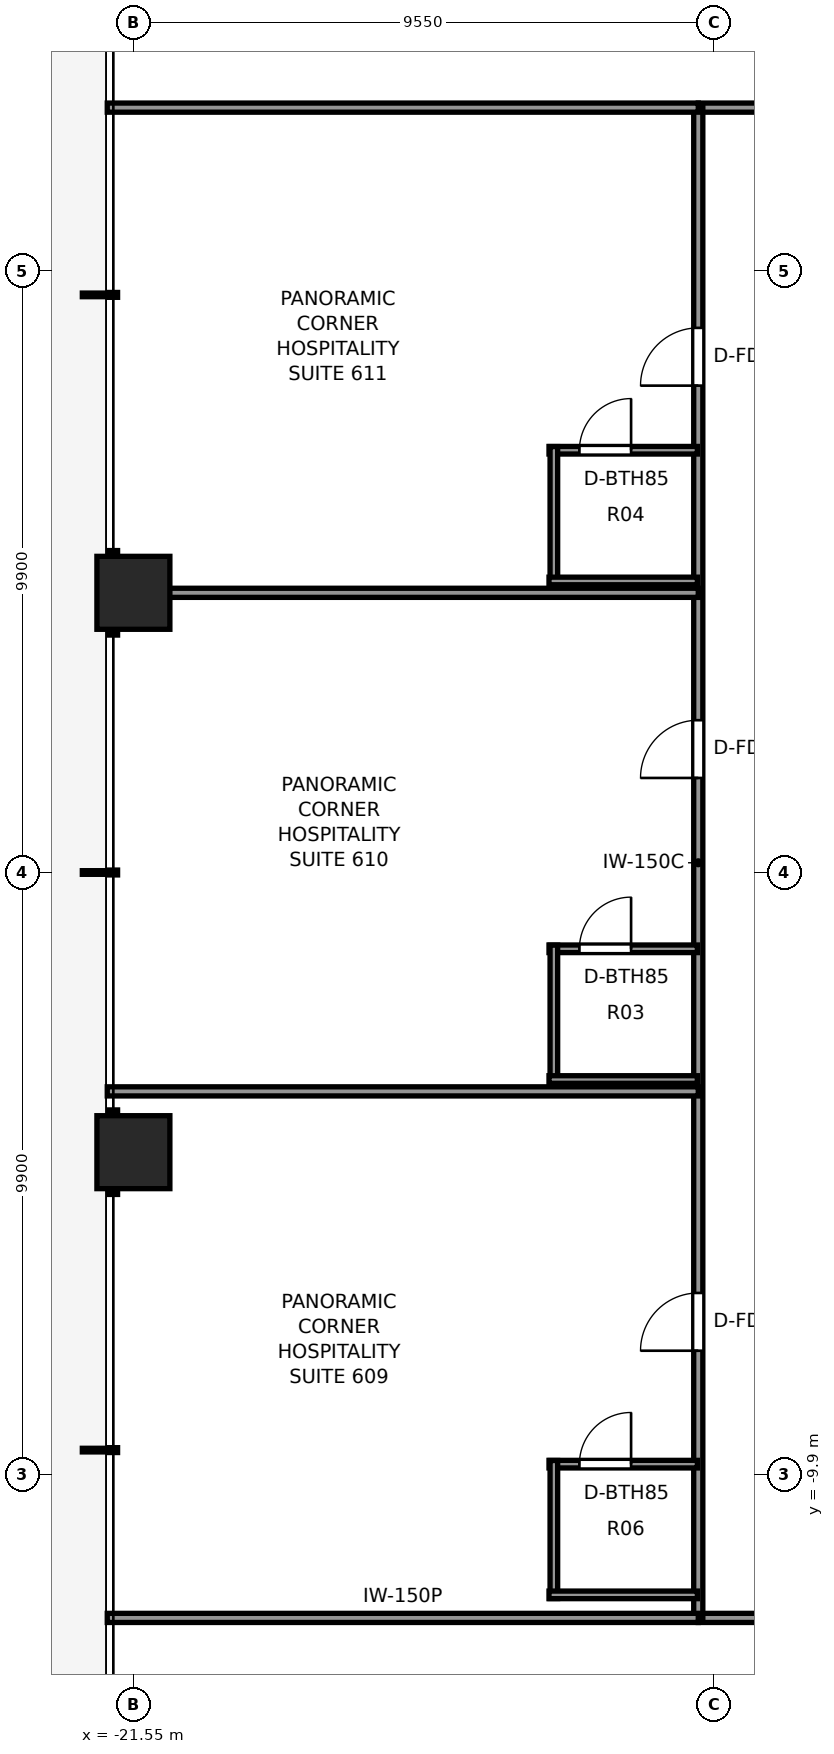
"""IFC4 building model, lengths in metres.
Left out: names, types, materials, properties, quantities, classifications, styles, units other than length and angle.
Written with IfcOpenShell. Run it as: python <this file> out.ifc"""

import sys

from ifc_helpers import new_model, si_unit, direction, frame, frame_2d, origin, origin_2d, place, context, subcontext, project, spatial, rectangle, extrude, element, fill, save


model = new_model("IFC4")
c1 = context("Model", 3, precision=1e-05, world=origin(), true_north=direction((0.0, 1.0)))
c2 = subcontext(c1, "Body", "Model", "MODEL_VIEW")
j1 = project(units=[si_unit("LENGTHUNIT", "METRE"), si_unit("PLANEANGLEUNIT", "RADIAN")], contexts=[c1])
p1 = place(None, origin())
s1 = spatial("IfcSite", under=j1, at=p1, CompositionType="ELEMENT")
p2 = place(p1, origin())
s2 = spatial("IfcBuilding", under=s1, at=p2, CompositionType="ELEMENT")
p3 = place(p2, frame((0.0, 0.0, 23.8)))
s3 = spatial("IfcBuildingStorey", under=s2, at=p3, CompositionType="ELEMENT", Elevation=23.8)
for number, where, z_axis, x_axis in (
    (1, (-21.55, -4.6, 0.0), (0.0, 0.0, 1.0), (1.0, 0.0, 0.0)),
    (2, (-21.55, 4.6, 0.0), (0.0, 0.0, 1.0), (1.0, 0.0, 0.0)),
):
    element("IfcColumn", number, at=place(p3, frame(where, z_axis=z_axis, x_axis=x_axis)), inside=s3, PredefinedType="COLUMN", context=c2, shape_type="SweptSolid", body=[
        extrude(rectangle(XDim=1.2, YDim=1.2, at=origin_2d()), origin(), (0.0, 0.0, 1.0), 3.3),
    ])
p4 = place(p3, frame((-12.26, -12.26, 0.0), z_axis=(0.0, 0.0, 1.0), x_axis=(1.0, 0.0, 0.0)))
e3 = element("IfcWall", 3, at=p4, inside=s3, PredefinedType="PARTITIONING", context=c2, shape_type="SweptSolid", body=[
    extrude(rectangle(XDim=24.68, YDim=0.15, at=frame_2d((12.34, 0.0))), origin(), (0.0, 0.0, 1.0), 2.272),
])
p5 = place(p4, frame((3.444, 0.0, 0.0)))
e4 = element("IfcOpeningElement", 4, at=p5, cuts=e3, PredefinedType="OPENING", context=c2, shape_type="SweptSolid", body=[
    extrude(rectangle(XDim=0.9, YDim=2.06, at=frame_2d((0.45, 1.03))), frame((0.0, 0.085, 0.0), z_axis=(0.0, -1.0, 0.0), x_axis=(1.0, 0.0, 0.0)), (0.0, 0.0, 1.0), 0.17),
])
p6 = place(p4, frame((5.779, 0.0, 0.0)))
e5 = element("IfcOpeningElement", 5, at=p6, cuts=e3, PredefinedType="OPENING", context=c2, shape_type="SweptSolid", body=[
    extrude(rectangle(XDim=0.9, YDim=2.06, at=frame_2d((0.45, 1.03))), frame((0.0, 0.085, 0.0), z_axis=(0.0, -1.0, 0.0), x_axis=(1.0, 0.0, 0.0)), (0.0, 0.0, 1.0), 0.17),
])
p7 = place(p4, frame((13.551, 0.0, 0.0)))
e6 = element("IfcOpeningElement", 6, at=p7, cuts=e3, PredefinedType="OPENING", context=c2, shape_type="SweptSolid", body=[
    extrude(rectangle(XDim=0.9, YDim=2.06, at=frame_2d((0.45, 1.03))), frame((0.0, 0.085, 0.0), z_axis=(0.0, -1.0, 0.0), x_axis=(1.0, 0.0, 0.0)), (0.0, 0.0, 1.0), 0.17),
])
p8 = place(p4, frame((17.921, 0.0, 0.0)))
e7 = element("IfcOpeningElement", 7, at=p8, cuts=e3, PredefinedType="OPENING", context=c2, shape_type="SweptSolid", body=[
    extrude(rectangle(XDim=0.9, YDim=2.06, at=frame_2d((0.45, 1.03))), frame((0.0, 0.085, 0.0), z_axis=(0.0, -1.0, 0.0), x_axis=(1.0, 0.0, 0.0)), (0.0, 0.0, 1.0), 0.17),
])
p9 = place(p4, frame((20.256, 0.0, 0.0)))
e8 = element("IfcOpeningElement", 8, at=p9, cuts=e3, PredefinedType="OPENING", context=c2, shape_type="SweptSolid", body=[
    extrude(rectangle(XDim=0.9, YDim=2.06, at=frame_2d((0.45, 1.03))), frame((0.0, 0.085, 0.0), z_axis=(0.0, -1.0, 0.0), x_axis=(1.0, 0.0, 0.0)), (0.0, 0.0, 1.0), 0.17),
])
p10 = place(p3, frame((-12.26, 12.58, 0.0), z_axis=(0.0, 0.0, 1.0), x_axis=(1.0, 0.0, 0.0)))
e9 = element("IfcWall", 9, at=p10, inside=s3, PredefinedType="PARTITIONING", context=c2, shape_type="SweptSolid", body=[
    extrude(rectangle(XDim=24.68, YDim=0.15, at=frame_2d((12.34, 0.0))), origin(), (0.0, 0.0, 1.0), 2.272),
])
p11 = place(p10, frame((3.444, 0.0, 0.0)))
e10 = element("IfcOpeningElement", 10, at=p11, cuts=e9, PredefinedType="OPENING", context=c2, shape_type="SweptSolid", body=[
    extrude(rectangle(XDim=0.9, YDim=2.06, at=frame_2d((0.45, 1.03))), frame((0.0, 0.085, 0.0), z_axis=(0.0, -1.0, 0.0), x_axis=(1.0, 0.0, 0.0)), (0.0, 0.0, 1.0), 0.17),
])
p12 = place(p10, frame((9.78, 0.0, 0.0)))
e11 = element("IfcOpeningElement", 11, at=p12, cuts=e9, PredefinedType="OPENING", context=c2, shape_type="SweptSolid", body=[
    extrude(rectangle(XDim=0.9, YDim=2.06, at=frame_2d((0.45, 1.03))), frame((0.0, 0.085, 0.0), z_axis=(0.0, -1.0, 0.0), x_axis=(1.0, 0.0, 0.0)), (0.0, 0.0, 1.0), 0.17),
])
p13 = place(p10, frame((19.345, 0.0, 0.0)))
e12 = element("IfcOpeningElement", 12, at=p13, cuts=e9, PredefinedType="OPENING", context=c2, shape_type="SweptSolid", body=[
    extrude(rectangle(XDim=0.9, YDim=2.06, at=frame_2d((0.45, 1.03))), frame((0.0, 0.085, 0.0), z_axis=(0.0, -1.0, 0.0), x_axis=(1.0, 0.0, 0.0)), (0.0, 0.0, 1.0), 0.17),
])
p14 = place(p3, frame((-12.26, -12.26, 0.0), z_axis=(0.0, 0.0, 1.0), x_axis=(0.0, 1.0, 0.0)))
e13 = element("IfcWall", 13, at=p14, inside=s3, PredefinedType="PARTITIONING", context=c2, shape_type="SweptSolid", body=[
    extrude(rectangle(XDim=24.84, YDim=0.15, at=frame_2d((12.42, 0.0))), origin(), (0.0, 0.0, 1.0), 2.272),
])
p15 = place(p14, frame((4.395, 0.0, 0.0)))
e14 = element("IfcOpeningElement", 14, at=p15, cuts=e13, PredefinedType="OPENING", context=c2, shape_type="SweptSolid", body=[
    extrude(rectangle(XDim=0.95, YDim=2.06, at=frame_2d((0.475, 1.03))), frame((0.0, 0.085, 0.0), z_axis=(0.0, -1.0, 0.0), x_axis=(1.0, 0.0, 0.0)), (0.0, 0.0, 1.0), 0.17),
])
p16 = place(p14, frame((13.815, 0.0, 0.0)))
e15 = element("IfcOpeningElement", 15, at=p16, cuts=e13, PredefinedType="OPENING", context=c2, shape_type="SweptSolid", body=[
    extrude(rectangle(XDim=0.95, YDim=2.06, at=frame_2d((0.475, 1.03))), frame((0.0, 0.085, 0.0), z_axis=(0.0, -1.0, 0.0), x_axis=(1.0, 0.0, 0.0)), (0.0, 0.0, 1.0), 0.17),
])
p17 = place(p14, frame((20.268, 0.0, 0.0)))
e16 = element("IfcOpeningElement", 16, at=p17, cuts=e13, PredefinedType="OPENING", context=c2, shape_type="SweptSolid", body=[
    extrude(rectangle(XDim=0.95, YDim=2.06, at=frame_2d((0.475, 1.03))), frame((0.0, 0.085, 0.0), z_axis=(0.0, -1.0, 0.0), x_axis=(1.0, 0.0, 0.0)), (0.0, 0.0, 1.0), 0.17),
])
for number, where, z_axis, x_axis in (
    (17, (-21.98, -12.26, 0.0), (0.0, 0.0, 1.0), (1.0, 0.0, 0.0)),
    (18, (-21.98, 12.58, 0.0), (0.0, 0.0, 1.0), (1.0, 0.0, 0.0)),
):
    element("IfcWall", number, at=place(p3, frame(where, z_axis=z_axis, x_axis=x_axis)), inside=s3, PredefinedType="PARTITIONING", context=c2, shape_type="SweptSolid", body=[
        extrude(rectangle(XDim=9.72, YDim=0.15, at=frame_2d((4.86, 0.0))), origin(), (0.0, 0.0, 1.0), 2.272),
    ])
p18 = place(p3, frame((-21.98, -3.6, 0.0), z_axis=(0.0, 0.0, 1.0), x_axis=(1.0, 0.0, 0.0)))
e19 = element("IfcWall", 19, at=p18, inside=s3, PredefinedType="PARTITIONING", context=c2, shape_type="SweptSolid", body=[
    extrude(rectangle(XDim=9.72, YDim=0.15, at=frame_2d((4.86, 0.0))), origin(), (0.0, 0.0, 1.0), 2.429),
])
p19 = place(p3, frame((-14.715, -9.731, 0.0), z_axis=(0.0, 0.0, 1.0), x_axis=(1.0, 0.0, 0.0)))
e20 = element("IfcWall", 20, at=p19, inside=s3, PredefinedType="PARTITIONING", context=c2, shape_type="SweptSolid", body=[
    extrude(rectangle(XDim=2.44, YDim=0.125, at=frame_2d((1.22, 0.0))), origin(), (0.0, 0.0, 1.0), 3.06),
])
p20 = place(p19, frame((0.5, 0.0, 0.0)))
e21 = element("IfcOpeningElement", 21, at=p20, cuts=e20, PredefinedType="OPENING", context=c2, shape_type="SweptSolid", body=[
    extrude(rectangle(XDim=0.85, YDim=2.03, at=frame_2d((0.425, 1.015))), frame((0.0, 0.073, 0.0), z_axis=(0.0, -1.0, 0.0), x_axis=(1.0, 0.0, 0.0)), (0.0, 0.0, 1.0), 0.145),
])
p21 = place(p3, frame((-14.635, -11.941, 0.0), z_axis=(0.0, 0.0, 1.0), x_axis=(0.0, 1.0, 0.0)))
e22 = element("IfcWall", 22, at=p21, inside=s3, PredefinedType="PARTITIONING", context=c2, shape_type="SweptSolid", body=[
    extrude(rectangle(XDim=2.27, YDim=0.125, at=frame_2d((1.135, 0.0))), origin(), (0.0, 0.0, 1.0), 2.272),
])
p22 = place(p3, frame((-14.715, -11.881, 0.0), z_axis=(0.0, 0.0, 1.0), x_axis=(1.0, 0.0, 0.0)))
e23 = element("IfcWall", 23, at=p22, inside=s3, PredefinedType="PARTITIONING", context=c2, shape_type="SweptSolid", body=[
    extrude(rectangle(XDim=2.44, YDim=0.125, at=frame_2d((1.22, 0.0))), origin(), (0.0, 0.0, 1.0), 2.272),
])
p23 = place(p3, frame((-21.98, 4.6, 0.0), z_axis=(0.0, 0.0, 1.0), x_axis=(1.0, 0.0, 0.0)))
e24 = element("IfcWall", 24, at=p23, inside=s3, PredefinedType="PARTITIONING", context=c2, shape_type="SweptSolid", body=[
    extrude(rectangle(XDim=9.72, YDim=0.15, at=frame_2d((4.86, 0.0))), origin(), (0.0, 0.0, 1.0), 2.272),
])
p24 = place(p3, frame((-14.715, -1.255, 0.0), z_axis=(0.0, 0.0, 1.0), x_axis=(1.0, 0.0, 0.0)))
e25 = element("IfcWall", 25, at=p24, inside=s3, PredefinedType="PARTITIONING", context=c2, shape_type="SweptSolid", body=[
    extrude(rectangle(XDim=2.44, YDim=0.125, at=frame_2d((1.22, 0.0))), origin(), (0.0, 0.0, 1.0), 3.06),
])
p25 = place(p24, frame((0.5, 0.0, 0.0)))
e26 = element("IfcOpeningElement", 26, at=p25, cuts=e25, PredefinedType="OPENING", context=c2, shape_type="SweptSolid", body=[
    extrude(rectangle(XDim=0.85, YDim=2.03, at=frame_2d((0.425, 1.015))), frame((0.0, 0.073, 0.0), z_axis=(0.0, -1.0, 0.0), x_axis=(1.0, 0.0, 0.0)), (0.0, 0.0, 1.0), 0.145),
])
p26 = place(p3, frame((-14.635, -3.465, 0.0), z_axis=(0.0, 0.0, 1.0), x_axis=(0.0, 1.0, 0.0)))
e27 = element("IfcWall", 27, at=p26, inside=s3, PredefinedType="PARTITIONING", context=c2, shape_type="SweptSolid", body=[
    extrude(rectangle(XDim=2.27, YDim=0.125, at=frame_2d((1.135, 0.0))), origin(), (0.0, 0.0, 1.0), 3.06),
])
p27 = place(p3, frame((-14.715, -3.405, 0.0), z_axis=(0.0, 0.0, 1.0), x_axis=(1.0, 0.0, 0.0)))
e28 = element("IfcWall", 28, at=p27, inside=s3, PredefinedType="PARTITIONING", context=c2, shape_type="SweptSolid", body=[
    extrude(rectangle(XDim=2.44, YDim=0.125, at=frame_2d((1.22, 0.0))), origin(), (0.0, 0.0, 1.0), 3.06),
])
p28 = place(p3, frame((-14.715, 6.945, 0.0), z_axis=(0.0, 0.0, 1.0), x_axis=(1.0, 0.0, 0.0)))
e29 = element("IfcWall", 29, at=p28, inside=s3, PredefinedType="PARTITIONING", context=c2, shape_type="SweptSolid", body=[
    extrude(rectangle(XDim=2.44, YDim=0.125, at=frame_2d((1.22, 0.0))), origin(), (0.0, 0.0, 1.0), 3.06),
])
p29 = place(p28, frame((0.5, 0.0, 0.0)))
e30 = element("IfcOpeningElement", 30, at=p29, cuts=e29, PredefinedType="OPENING", context=c2, shape_type="SweptSolid", body=[
    extrude(rectangle(XDim=0.85, YDim=2.03, at=frame_2d((0.425, 1.015))), frame((0.0, 0.073, 0.0), z_axis=(0.0, -1.0, 0.0), x_axis=(1.0, 0.0, 0.0)), (0.0, 0.0, 1.0), 0.145),
])
p30 = place(p3, frame((-14.635, 4.735, 0.0), z_axis=(0.0, 0.0, 1.0), x_axis=(0.0, 1.0, 0.0)))
e31 = element("IfcWall", 31, at=p30, inside=s3, PredefinedType="PARTITIONING", context=c2, shape_type="SweptSolid", body=[
    extrude(rectangle(XDim=2.27, YDim=0.125, at=frame_2d((1.135, 0.0))), origin(), (0.0, 0.0, 1.0), 2.272),
])
p31 = place(p3, frame((-14.715, 4.795, 0.0), z_axis=(0.0, 0.0, 1.0), x_axis=(1.0, 0.0, 0.0)))
e32 = element("IfcWall", 32, at=p31, inside=s3, PredefinedType="PARTITIONING", context=c2, shape_type="SweptSolid", body=[
    extrude(rectangle(XDim=2.44, YDim=0.125, at=frame_2d((1.22, 0.0))), origin(), (0.0, 0.0, 1.0), 2.272),
])
p32 = place(p20, origin())
e33 = element("IfcDoor", 33, at=p32, inside=s3, OperationType="SINGLE_SWING_RIGHT", PredefinedType="DOOR", context=c2, shape_type="SweptSolid", body=[
    extrude(rectangle(XDim=0.85, YDim=2.03, at=frame_2d((0.425, 1.015))), frame((0.0, 0.025, 0.0), z_axis=(0.0, -1.0, 0.0), x_axis=(1.0, 0.0, 0.0)), (0.0, 0.0, 1.0), 0.05),
])
fill(e21, e33)
p33 = place(p15, origin())
e34 = element("IfcDoor", 34, at=p33, inside=s3, OperationType="SINGLE_SWING_LEFT", PredefinedType="DOOR", context=c2, shape_type="SweptSolid", body=[
    extrude(rectangle(XDim=0.95, YDim=2.06, at=frame_2d((0.475, 1.03))), frame((0.0, 0.025, 0.0), z_axis=(0.0, -1.0, 0.0), x_axis=(1.0, 0.0, 0.0)), (0.0, 0.0, 1.0), 0.05),
])
fill(e14, e34)
p34 = place(p25, origin())
e35 = element("IfcDoor", 35, at=p34, inside=s3, OperationType="SINGLE_SWING_RIGHT", PredefinedType="DOOR", context=c2, shape_type="SweptSolid", body=[
    extrude(rectangle(XDim=0.85, YDim=2.03, at=frame_2d((0.425, 1.015))), frame((0.0, 0.025, 0.0), z_axis=(0.0, -1.0, 0.0), x_axis=(1.0, 0.0, 0.0)), (0.0, 0.0, 1.0), 0.05),
])
fill(e26, e35)
p35 = place(p16, origin())
e36 = element("IfcDoor", 36, at=p35, inside=s3, OperationType="SINGLE_SWING_LEFT", PredefinedType="DOOR", context=c2, shape_type="SweptSolid", body=[
    extrude(rectangle(XDim=0.95, YDim=2.06, at=frame_2d((0.475, 1.03))), frame((0.0, 0.025, 0.0), z_axis=(0.0, -1.0, 0.0), x_axis=(1.0, 0.0, 0.0)), (0.0, 0.0, 1.0), 0.05),
])
fill(e15, e36)
p36 = place(p29, origin())
e37 = element("IfcDoor", 37, at=p36, inside=s3, OperationType="SINGLE_SWING_RIGHT", PredefinedType="DOOR", context=c2, shape_type="SweptSolid", body=[
    extrude(rectangle(XDim=0.85, YDim=2.03, at=frame_2d((0.425, 1.015))), frame((0.0, 0.025, 0.0), z_axis=(0.0, -1.0, 0.0), x_axis=(1.0, 0.0, 0.0)), (0.0, 0.0, 1.0), 0.05),
])
fill(e30, e37)
p37 = place(p17, origin())
e38 = element("IfcDoor", 38, at=p37, inside=s3, OperationType="SINGLE_SWING_LEFT", PredefinedType="DOOR", context=c2, shape_type="SweptSolid", body=[
    extrude(rectangle(XDim=0.95, YDim=2.06, at=frame_2d((0.475, 1.03))), frame((0.0, 0.025, 0.0), z_axis=(0.0, -1.0, 0.0), x_axis=(1.0, 0.0, 0.0)), (0.0, 0.0, 1.0), 0.05),
])
fill(e16, e38)
save(model, sys.argv[1])
